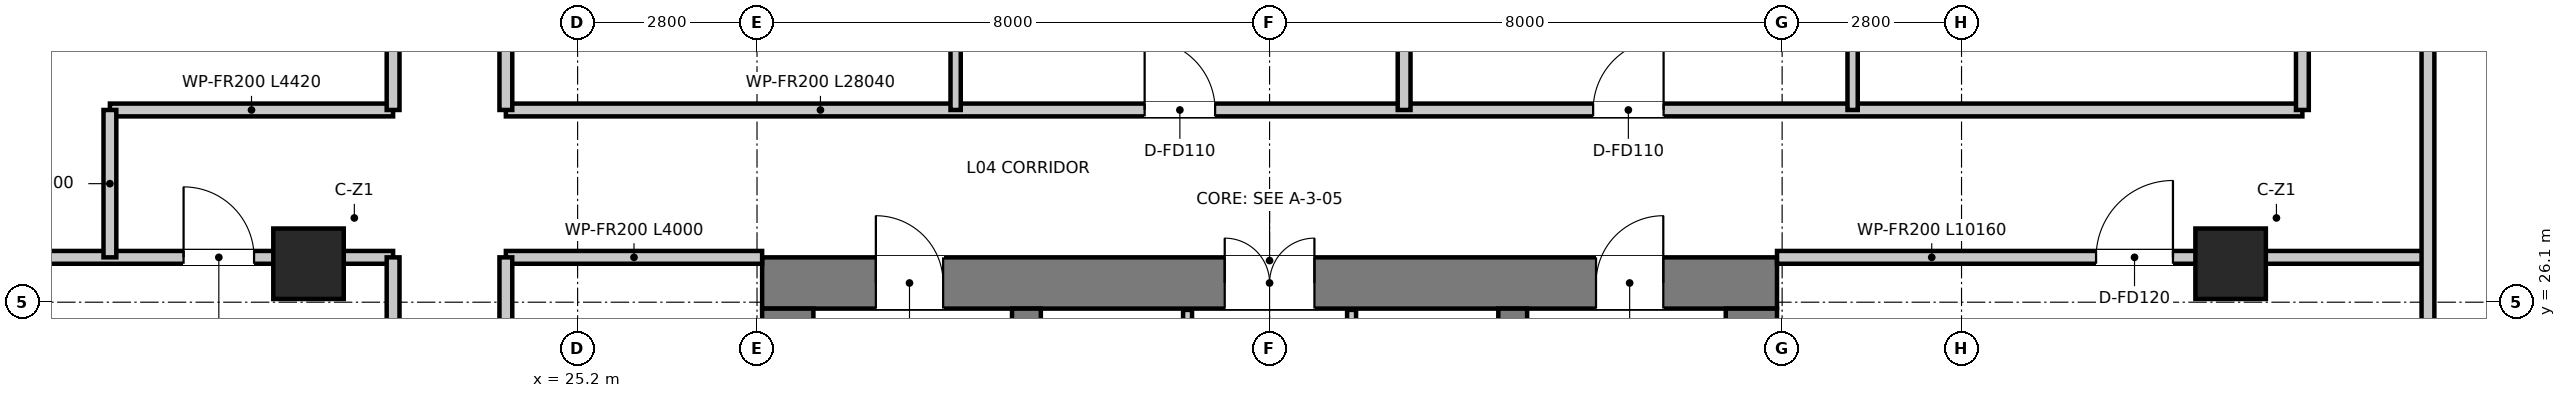
"""IFC4 building model, lengths in metres.
Left out: names, types, materials, properties, quantities, classifications, styles, units other than length and angle.
Written with IfcOpenShell. Run it as: python <this file> out.ifc"""

import sys

from ifc_helpers import new_model, si_unit, direction, frame, frame_2d, origin, origin_2d, place, context, subcontext, project, spatial, rectangle, extrude, source, transform, mapped, element, fill, save


model = new_model("IFC4")
c1 = context("Model", 3, precision=1e-05, world=origin(), true_north=direction((0.0, 1.0)))
c2 = subcontext(c1, "Body", "Model", "MODEL_VIEW")
j1 = project(units=[si_unit("LENGTHUNIT", "METRE"), si_unit("PLANEANGLEUNIT", "RADIAN")], contexts=[c1])
p1 = place(None, origin())
s1 = spatial("IfcSite", under=j1, at=p1, CompositionType="ELEMENT")
p2 = place(p1, origin())
s2 = spatial("IfcBuilding", under=s1, at=p2, CompositionType="ELEMENT")
p3 = place(p2, frame((0.0, 0.0, 20.0)))
s3 = spatial("IfcBuildingStorey", under=s2, at=p3, CompositionType="ELEMENT", Elevation=20.0)
p4 = place(p3, frame((28.08, 26.4, 0.0), z_axis=(0.0, 0.0, 1.0), x_axis=(1.0, 0.0, 0.0)))
e1 = element("IfcWall", 1, at=p4, inside=s3, PredefinedType="SHEAR", context=c2, shape_type="SweptSolid", body=[
    extrude(rectangle(XDim=15.84, YDim=0.8, at=frame_2d((7.92, 0.0))), origin(), (0.0, 0.0, 1.0), 5.0),
])
p5 = place(p4, frame((7.22, 0.0, 0.0)))
e2 = element("IfcOpeningElement", 2, at=p5, cuts=e1, PredefinedType="OPENING", context=c2, shape_type="SweptSolid", body=[
    extrude(rectangle(XDim=1.4, YDim=2.2, at=frame_2d((0.7, 1.1))), frame((0.0, 0.41, 0.0), z_axis=(0.0, -1.0, 0.0), x_axis=(1.0, 0.0, 0.0)), (0.0, 0.0, 1.0), 0.82),
])
p6 = place(p4, frame((1.775, 0.0, 0.0)))
e3 = element("IfcOpeningElement", 3, at=p6, cuts=e1, PredefinedType="OPENING", context=c2, shape_type="SweptSolid", body=[
    extrude(rectangle(XDim=1.05, YDim=2.1, at=frame_2d((0.525, 1.05))), frame((0.0, 0.41, 0.0), z_axis=(0.0, -1.0, 0.0), x_axis=(1.0, 0.0, 0.0)), (0.0, 0.0, 1.0), 0.82),
])
p7 = place(p4, frame((13.015, 0.0, 0.0)))
e4 = element("IfcOpeningElement", 4, at=p7, cuts=e1, PredefinedType="OPENING", context=c2, shape_type="SweptSolid", body=[
    extrude(rectangle(XDim=1.05, YDim=2.1, at=frame_2d((0.525, 1.05))), frame((0.0, 0.41, 0.0), z_axis=(0.0, -1.0, 0.0), x_axis=(1.0, 0.0, 0.0)), (0.0, 0.0, 1.0), 0.82),
])
for number, where, z_axis, x_axis in (
    (5, (28.48, 11.3, 0.0), (0.0, 0.0, 1.0), (0.0, 1.0, 0.0)),
    (6, (43.52, 11.3, 0.0), (0.0, 0.0, 1.0), (0.0, 1.0, 0.0)),
):
    element("IfcWall", number, at=place(p3, frame(where, z_axis=z_axis, x_axis=x_axis)), inside=s3, PredefinedType="SHEAR", context=c2, shape_type="SweptSolid", body=[
        extrude(rectangle(XDim=14.7, YDim=0.8, at=frame_2d((7.35, 0.0))), origin(), (0.0, 0.0, 1.0), 5.0),
    ])
p8 = place(p3, frame((32.205, 13.22, 0.0), z_axis=(0.0, 0.0, 1.0), x_axis=(0.0, 1.0, 0.0)))
e7 = element("IfcWall", 7, at=p8, inside=s3, PredefinedType="SHEAR", context=c2, shape_type="SweptSolid", body=[
    extrude(rectangle(XDim=12.78, YDim=0.45, at=frame_2d((6.39, 0.0))), origin(), (0.0, 0.0, 1.0), 5.0),
])
p9 = place(p8, frame((10.58, 0.0, 0.0)))
e8 = element("IfcOpeningElement", 8, at=p9, cuts=e7, PredefinedType="OPENING", context=c2, shape_type="SweptSolid", body=[
    extrude(rectangle(XDim=1.1, YDim=2.15, at=frame_2d((0.55, 1.075))), frame((0.0, 0.235, 0.0), z_axis=(0.0, -1.0, 0.0), x_axis=(1.0, 0.0, 0.0)), (0.0, 0.0, 1.0), 0.47),
])
p10 = place(p3, frame((39.795, 13.22, 0.0), z_axis=(0.0, 0.0, 1.0), x_axis=(0.0, 1.0, 0.0)))
e9 = element("IfcWall", 9, at=p10, inside=s3, PredefinedType="SHEAR", context=c2, shape_type="SweptSolid", body=[
    extrude(rectangle(XDim=12.78, YDim=0.45, at=frame_2d((6.39, 0.0))), origin(), (0.0, 0.0, 1.0), 5.0),
])
p11 = place(p10, frame((10.58, 0.0, 0.0)))
e10 = element("IfcOpeningElement", 10, at=p11, cuts=e9, PredefinedType="OPENING", context=c2, shape_type="SweptSolid", body=[
    extrude(rectangle(XDim=1.1, YDim=2.15, at=frame_2d((0.55, 1.075))), frame((0.0, 0.235, 0.0), z_axis=(0.0, -1.0, 0.0), x_axis=(1.0, 0.0, 0.0)), (0.0, 0.0, 1.0), 0.47),
])
m1 = source(origin(), c2, "Body", "SweptSolid", [
    extrude(rectangle(XDim=1.1, YDim=1.1, at=origin_2d()), origin(), (0.0, 0.0, 1.0), 5.0),
])
for number, where, z_axis, x_axis in (
    (11, (21.0, 26.7, 0.0), (0.0, 0.0, 1.0), (1.0, 0.0, 0.0)),
    (12, (51.0, 26.7, 0.0), (0.0, 0.0, 1.0), (1.0, 0.0, 0.0)),
):
    element("IfcColumn", number, at=place(p3, frame(where, z_axis=z_axis, x_axis=x_axis)), inside=s3, PredefinedType="COLUMN", context=c2, shape_type="MappedRepresentation", body=[
        mapped(m1, transform((0.0, 0.0, 0.0), x_axis=(1.0, 0.0, 0.0), y_axis=(0.0, 1.0, 0.0), z_axis=(0.0, 0.0, 1.0), scale=1.0)),
    ])
p12 = place(p3, frame((34.72, 20.2, 0.0), z_axis=(0.0, 0.0, 1.0), x_axis=(0.0, 1.0, 0.0)))
e13 = element("IfcWall", 13, at=p12, inside=s3, PredefinedType="PARTITIONING", context=c2, shape_type="SweptSolid", body=[
    extrude(rectangle(XDim=5.78, YDim=0.14, at=frame_2d((2.89, 0.0))), origin(), (0.0, 0.0, 1.0), 3.52),
])
p13 = place(p12, frame((1.05, 0.0, 0.0)))
e14 = element("IfcOpeningElement", 14, at=p13, cuts=e13, PredefinedType="OPENING", context=c2, shape_type="SweptSolid", body=[
    extrude(rectangle(XDim=0.9, YDim=2.1, at=frame_2d((0.45, 1.05))), frame((0.0, 0.08, 0.0), z_axis=(0.0, -1.0, 0.0), x_axis=(1.0, 0.0, 0.0)), (0.0, 0.0, 1.0), 0.16),
])
p14 = place(p3, frame((37.28, 20.2, 0.0), z_axis=(0.0, 0.0, 1.0), x_axis=(0.0, 1.0, 0.0)))
e15 = element("IfcWall", 15, at=p14, inside=s3, PredefinedType="PARTITIONING", context=c2, shape_type="SweptSolid", body=[
    extrude(rectangle(XDim=5.78, YDim=0.14, at=frame_2d((2.89, 0.0))), origin(), (0.0, 0.0, 1.0), 3.52),
])
p15 = place(p14, frame((0.95, 0.0, 0.0)))
e16 = element("IfcOpeningElement", 16, at=p15, cuts=e15, PredefinedType="OPENING", context=c2, shape_type="SweptSolid", body=[
    extrude(rectangle(XDim=1.1, YDim=2.15, at=frame_2d((0.55, 1.075))), frame((0.0, 0.08, 0.0), z_axis=(0.0, -1.0, 0.0), x_axis=(1.0, 0.0, 0.0)), (0.0, 0.0, 1.0), 0.16),
])
p16 = place(p3, frame((11.305, 26.8, 0.0), z_axis=(0.0, 0.0, 1.0), x_axis=(1.0, 0.0, 0.0)))
e17 = element("IfcWall", 17, at=p16, inside=s3, PredefinedType="PARTITIONING", context=c2, shape_type="SweptSolid", body=[
    extrude(rectangle(XDim=11.015, YDim=0.2, at=frame_2d((5.508, 0.0))), origin(), (0.0, 0.0, 1.0), 2.92),
])
p17 = place(p16, frame((7.745, 0.0, 0.0)))
e18 = element("IfcOpeningElement", 18, at=p17, cuts=e17, PredefinedType="OPENING", context=c2, shape_type="SweptSolid", body=[
    extrude(rectangle(XDim=1.1, YDim=2.15, at=frame_2d((0.55, 1.075))), frame((0.0, 0.11, 0.0), z_axis=(0.0, -1.0, 0.0), x_axis=(1.0, 0.0, 0.0)), (0.0, 0.0, 1.0), 0.22),
])
p18 = place(p3, frame((24.08, 26.8, 0.0), z_axis=(0.0, 0.0, 1.0), x_axis=(1.0, 0.0, 0.0)))
e19 = element("IfcWall", 19, at=p18, inside=s3, PredefinedType="PARTITIONING", context=c2, shape_type="SweptSolid", body=[
    extrude(rectangle(XDim=4.0, YDim=0.2, at=frame_2d((2.0, 0.0))), origin(), (0.0, 0.0, 1.0), 3.92),
])
p19 = place(p3, frame((43.92, 26.8, 0.0), z_axis=(0.0, 0.0, 1.0), x_axis=(1.0, 0.0, 0.0)))
e20 = element("IfcWall", 20, at=p19, inside=s3, PredefinedType="PARTITIONING", context=c2, shape_type="SweptSolid", body=[
    extrude(rectangle(XDim=10.16, YDim=0.2, at=frame_2d((5.08, 0.0))), origin(), (0.0, 0.0, 1.0), 3.92),
])
p20 = place(p19, frame((4.98, 0.0, 0.0)))
e21 = element("IfcOpeningElement", 21, at=p20, cuts=e20, PredefinedType="OPENING", context=c2, shape_type="SweptSolid", body=[
    extrude(rectangle(XDim=1.2, YDim=2.15, at=frame_2d((0.6, 1.075))), frame((0.0, 0.11, 0.0), z_axis=(0.0, -1.0, 0.0), x_axis=(1.0, 0.0, 0.0)), (0.0, 0.0, 1.0), 0.22),
])
p21 = place(p3, frame((17.9, 29.1, 0.0), z_axis=(0.0, 0.0, 1.0), x_axis=(1.0, 0.0, 0.0)))
e22 = element("IfcWall", 22, at=p21, inside=s3, PredefinedType="PARTITIONING", context=c2, shape_type="SweptSolid", body=[
    extrude(rectangle(XDim=4.42, YDim=0.2, at=frame_2d((2.21, 0.0))), origin(), (0.0, 0.0, 1.0), 4.03),
])
p22 = place(p3, frame((24.08, 29.1, 0.0), z_axis=(0.0, 0.0, 1.0), x_axis=(1.0, 0.0, 0.0)))
e23 = element("IfcWall", 23, at=p22, inside=s3, PredefinedType="PARTITIONING", context=c2, shape_type="SweptSolid", body=[
    extrude(rectangle(XDim=28.04, YDim=0.2, at=frame_2d((14.02, 0.0))), origin(), (0.0, 0.0, 1.0), 3.92),
])
p23 = place(p22, frame((9.97, 0.0, 0.0)))
e24 = element("IfcOpeningElement", 24, at=p23, cuts=e23, PredefinedType="OPENING", context=c2, shape_type="SweptSolid", body=[
    extrude(rectangle(XDim=1.1, YDim=2.15, at=frame_2d((0.55, 1.075))), frame((0.0, 0.11, 0.0), z_axis=(0.0, -1.0, 0.0), x_axis=(1.0, 0.0, 0.0)), (0.0, 0.0, 1.0), 0.22),
])
p24 = place(p22, frame((16.97, 0.0, 0.0)))
e25 = element("IfcOpeningElement", 25, at=p24, cuts=e23, PredefinedType="OPENING", context=c2, shape_type="SweptSolid", body=[
    extrude(rectangle(XDim=1.1, YDim=2.15, at=frame_2d((0.55, 1.075))), frame((0.0, 0.11, 0.0), z_axis=(0.0, -1.0, 0.0), x_axis=(1.0, 0.0, 0.0)), (0.0, 0.0, 1.0), 0.22),
])
p25 = place(p3, frame((22.32, 0.605, 0.0), z_axis=(0.0, 0.0, 1.0), x_axis=(0.0, 1.0, 0.0)))
e26 = element("IfcWall", 26, at=p25, inside=s3, PredefinedType="PARTITIONING", context=c2, shape_type="SweptSolid", body=[
    extrude(rectangle(XDim=26.195, YDim=0.2, at=frame_2d((13.098, 0.0))), origin(), (0.0, 0.0, 1.0), 4.02),
])
p26 = place(p25, frame((10.645, 0.0, 0.0)))
e27 = element("IfcOpeningElement", 27, at=p26, cuts=e26, PredefinedType="OPENING", context=c2, shape_type="SweptSolid", body=[
    extrude(rectangle(XDim=1.1, YDim=2.15, at=frame_2d((0.55, 1.075))), frame((0.0, 0.11, 0.0), z_axis=(0.0, -1.0, 0.0), x_axis=(1.0, 0.0, 0.0)), (0.0, 0.0, 1.0), 0.22),
])
p27 = place(p3, frame((24.08, 0.605, 0.0), z_axis=(0.0, 0.0, 1.0), x_axis=(0.0, 1.0, 0.0)))
e28 = element("IfcWall", 28, at=p27, inside=s3, PredefinedType="PARTITIONING", context=c2, shape_type="SweptSolid", body=[
    extrude(rectangle(XDim=26.195, YDim=0.2, at=frame_2d((13.098, 0.0))), origin(), (0.0, 0.0, 1.0), 4.02),
])
p28 = place(p27, frame((19.845, 0.0, 0.0)))
e29 = element("IfcOpeningElement", 29, at=p28, cuts=e28, PredefinedType="OPENING", context=c2, shape_type="SweptSolid", body=[
    extrude(rectangle(XDim=1.1, YDim=2.15, at=frame_2d((0.55, 1.075))), frame((0.0, 0.11, 0.0), z_axis=(0.0, -1.0, 0.0), x_axis=(1.0, 0.0, 0.0)), (0.0, 0.0, 1.0), 0.22),
])
p29 = place(p3, frame((22.32, 29.1, 0.0), z_axis=(0.0, 0.0, 1.0), x_axis=(0.0, 1.0, 0.0)))
e30 = element("IfcWall", 30, at=p29, inside=s3, PredefinedType="PARTITIONING", context=c2, shape_type="SweptSolid", body=[
    extrude(rectangle(XDim=20.72, YDim=0.2, at=frame_2d((10.36, 0.0))), origin(), (0.0, 0.0, 1.0), 4.02),
])
p30 = place(p29, frame((3.35, 0.0, 0.0)))
e31 = element("IfcOpeningElement", 31, at=p30, cuts=e30, PredefinedType="OPENING", context=c2, shape_type="SweptSolid", body=[
    extrude(rectangle(XDim=1.1, YDim=2.15, at=frame_2d((0.55, 1.075))), frame((0.0, 0.11, 0.0), z_axis=(0.0, -1.0, 0.0), x_axis=(1.0, 0.0, 0.0)), (0.0, 0.0, 1.0), 0.22),
])
p31 = place(p29, frame((10.475, 0.0, 0.0)))
e32 = element("IfcOpeningElement", 32, at=p31, cuts=e30, PredefinedType="OPENING", context=c2, shape_type="SweptSolid", body=[
    extrude(rectangle(XDim=1.05, YDim=2.1, at=frame_2d((0.525, 1.05))), frame((0.0, 0.11, 0.0), z_axis=(0.0, -1.0, 0.0), x_axis=(1.0, 0.0, 0.0)), (0.0, 0.0, 1.0), 0.22),
])
p32 = place(p3, frame((17.9, 26.8, 0.0), z_axis=(0.0, 0.0, 1.0), x_axis=(0.0, 1.0, 0.0)))
e33 = element("IfcWall", 33, at=p32, inside=s3, PredefinedType="PARTITIONING", context=c2, shape_type="SweptSolid", body=[
    extrude(rectangle(XDim=2.3, YDim=0.2, at=frame_2d((1.15, 0.0))), origin(), (0.0, 0.0, 1.0), 3.92),
])
p33 = place(p3, frame((24.08, 29.1, 0.0), z_axis=(0.0, 0.0, 1.0), x_axis=(0.0, 1.0, 0.0)))
e34 = element("IfcWall", 34, at=p33, inside=s3, PredefinedType="PARTITIONING", context=c2, shape_type="SweptSolid", body=[
    extrude(rectangle(XDim=20.72, YDim=0.2, at=frame_2d((10.36, 0.0))), origin(), (0.0, 0.0, 1.0), 4.02),
])
p34 = place(p33, frame((4.35, 0.0, 0.0)))
e35 = element("IfcOpeningElement", 35, at=p34, cuts=e34, PredefinedType="OPENING", context=c2, shape_type="SweptSolid", body=[
    extrude(rectangle(XDim=1.1, YDim=2.15, at=frame_2d((0.55, 1.075))), frame((0.0, 0.11, 0.0), z_axis=(0.0, -1.0, 0.0), x_axis=(1.0, 0.0, 0.0)), (0.0, 0.0, 1.0), 0.22),
])
p35 = place(p33, frame((14.85, 0.0, 0.0)))
e36 = element("IfcOpeningElement", 36, at=p35, cuts=e34, PredefinedType="OPENING", context=c2, shape_type="SweptSolid", body=[
    extrude(rectangle(XDim=1.1, YDim=2.15, at=frame_2d((0.55, 1.075))), frame((0.0, 0.11, 0.0), z_axis=(0.0, -1.0, 0.0), x_axis=(1.0, 0.0, 0.0)), (0.0, 0.0, 1.0), 0.22),
])
p36 = place(p3, frame((52.12, 29.1, 0.0), z_axis=(0.0, 0.0, 1.0), x_axis=(0.0, 1.0, 0.0)))
e37 = element("IfcWall", 37, at=p36, inside=s3, PredefinedType="PARTITIONING", context=c2, shape_type="SweptSolid", body=[
    extrude(rectangle(XDim=20.72, YDim=0.2, at=frame_2d((10.36, 0.0))), origin(), (0.0, 0.0, 1.0), 4.08),
])
p37 = place(p36, frame((4.35, 0.0, 0.0)))
e38 = element("IfcOpeningElement", 38, at=p37, cuts=e37, PredefinedType="OPENING", context=c2, shape_type="SweptSolid", body=[
    extrude(rectangle(XDim=1.1, YDim=2.15, at=frame_2d((0.55, 1.075))), frame((0.0, 0.11, 0.0), z_axis=(0.0, -1.0, 0.0), x_axis=(1.0, 0.0, 0.0)), (0.0, 0.0, 1.0), 0.22),
])
p38 = place(p36, frame((14.85, 0.0, 0.0)))
e39 = element("IfcOpeningElement", 39, at=p38, cuts=e37, PredefinedType="OPENING", context=c2, shape_type="SweptSolid", body=[
    extrude(rectangle(XDim=1.1, YDim=2.15, at=frame_2d((0.55, 1.075))), frame((0.0, 0.11, 0.0), z_axis=(0.0, -1.0, 0.0), x_axis=(1.0, 0.0, 0.0)), (0.0, 0.0, 1.0), 0.22),
])
p39 = place(p3, frame((54.08, 0.605, 0.0), z_axis=(0.0, 0.0, 1.0), x_axis=(0.0, 1.0, 0.0)))
e40 = element("IfcWall", 40, at=p39, inside=s3, PredefinedType="PARTITIONING", context=c2, shape_type="SweptSolid", body=[
    extrude(rectangle(XDim=49.215, YDim=0.2, at=frame_2d((24.607, 0.0))), origin(), (0.0, 0.0, 1.0), 4.08),
])
p40 = place(p39, frame((32.795, 0.0, 0.0)))
e41 = element("IfcOpeningElement", 41, at=p40, cuts=e40, PredefinedType="OPENING", context=c2, shape_type="SweptSolid", body=[
    extrude(rectangle(XDim=1.2, YDim=2.15, at=frame_2d((0.6, 1.075))), frame((0.0, 0.11, 0.0), z_axis=(0.0, -1.0, 0.0), x_axis=(1.0, 0.0, 0.0)), (0.0, 0.0, 1.0), 0.22),
])
p41 = place(p3, frame((31.1, 29.1, 0.0), z_axis=(0.0, 0.0, 1.0), x_axis=(0.0, 1.0, 0.0)))
e42 = element("IfcWall", 42, at=p41, inside=s3, PredefinedType="PARTITIONING", context=c2, shape_type="SweptSolid", body=[
    extrude(rectangle(XDim=20.72, YDim=0.16, at=frame_2d((10.36, 0.0))), origin(), (0.0, 0.0, 1.0), 3.92),
])
p42 = place(p3, frame((38.1, 29.1, 0.0), z_axis=(0.0, 0.0, 1.0), x_axis=(0.0, 1.0, 0.0)))
e43 = element("IfcWall", 43, at=p42, inside=s3, PredefinedType="PARTITIONING", context=c2, shape_type="SweptSolid", body=[
    extrude(rectangle(XDim=20.72, YDim=0.2, at=frame_2d((10.36, 0.0))), origin(), (0.0, 0.0, 1.0), 3.92),
])
p43 = place(p3, frame((45.1, 29.1, 0.0), z_axis=(0.0, 0.0, 1.0), x_axis=(0.0, 1.0, 0.0)))
e44 = element("IfcWall", 44, at=p43, inside=s3, PredefinedType="PARTITIONING", context=c2, shape_type="SweptSolid", body=[
    extrude(rectangle(XDim=20.72, YDim=0.16, at=frame_2d((10.36, 0.0))), origin(), (0.0, 0.0, 1.0), 3.92),
])
p44 = place(p5, origin())
e45 = element("IfcDoor", 45, at=p44, inside=s3, OperationType="DOUBLE_DOOR_SINGLE_SWING", PredefinedType="DOOR", context=c2, shape_type="SweptSolid", body=[
    extrude(rectangle(XDim=1.4, YDim=2.2, at=frame_2d((0.7, 1.1))), frame((0.0, 0.025, 0.0), z_axis=(0.0, -1.0, 0.0), x_axis=(1.0, 0.0, 0.0)), (0.0, 0.0, 1.0), 0.05),
])
fill(e2, e45)
p45 = place(p6, origin())
e46 = element("IfcDoor", 46, at=p45, inside=s3, OperationType="SINGLE_SWING_LEFT", PredefinedType="DOOR", context=c2, shape_type="SweptSolid", body=[
    extrude(rectangle(XDim=1.05, YDim=2.1, at=frame_2d((0.525, 1.05))), frame((0.0, 0.025, 0.0), z_axis=(0.0, -1.0, 0.0), x_axis=(1.0, 0.0, 0.0)), (0.0, 0.0, 1.0), 0.05),
])
fill(e3, e46)
p46 = place(p7, origin())
e47 = element("IfcDoor", 47, at=p46, inside=s3, OperationType="SINGLE_SWING_RIGHT", PredefinedType="DOOR", context=c2, shape_type="SweptSolid", body=[
    extrude(rectangle(XDim=1.05, YDim=2.1, at=frame_2d((0.525, 1.05))), frame((0.0, 0.025, 0.0), z_axis=(0.0, -1.0, 0.0), x_axis=(1.0, 0.0, 0.0)), (0.0, 0.0, 1.0), 0.05),
])
fill(e4, e47)
p47 = place(p17, origin())
e48 = element("IfcDoor", 48, at=p47, inside=s3, OperationType="SINGLE_SWING_LEFT", PredefinedType="DOOR", context=c2, shape_type="SweptSolid", body=[
    extrude(rectangle(XDim=1.1, YDim=2.15, at=frame_2d((0.55, 1.075))), frame((0.0, 0.025, 0.0), z_axis=(0.0, -1.0, 0.0), x_axis=(1.0, 0.0, 0.0)), (0.0, 0.0, 1.0), 0.05),
])
fill(e18, e48)
p48 = place(p20, origin())
e49 = element("IfcDoor", 49, at=p48, inside=s3, OperationType="SINGLE_SWING_RIGHT", PredefinedType="DOOR", context=c2, shape_type="SweptSolid", body=[
    extrude(rectangle(XDim=1.2, YDim=2.15, at=frame_2d((0.6, 1.075))), frame((0.0, 0.025, 0.0), z_axis=(0.0, -1.0, 0.0), x_axis=(1.0, 0.0, 0.0)), (0.0, 0.0, 1.0), 0.05),
])
fill(e21, e49)
p49 = place(p23, origin())
e50 = element("IfcDoor", 50, at=p49, inside=s3, OperationType="SINGLE_SWING_LEFT", PredefinedType="DOOR", context=c2, shape_type="SweptSolid", body=[
    extrude(rectangle(XDim=1.1, YDim=2.15, at=frame_2d((0.55, 1.075))), frame((0.0, 0.025, 0.0), z_axis=(0.0, -1.0, 0.0), x_axis=(1.0, 0.0, 0.0)), (0.0, 0.0, 1.0), 0.05),
])
fill(e24, e50)
p50 = place(p24, origin())
e51 = element("IfcDoor", 51, at=p50, inside=s3, OperationType="SINGLE_SWING_RIGHT", PredefinedType="DOOR", context=c2, shape_type="SweptSolid", body=[
    extrude(rectangle(XDim=1.1, YDim=2.15, at=frame_2d((0.55, 1.075))), frame((0.0, 0.025, 0.0), z_axis=(0.0, -1.0, 0.0), x_axis=(1.0, 0.0, 0.0)), (0.0, 0.0, 1.0), 0.05),
])
fill(e25, e51)
save(model, sys.argv[1])
